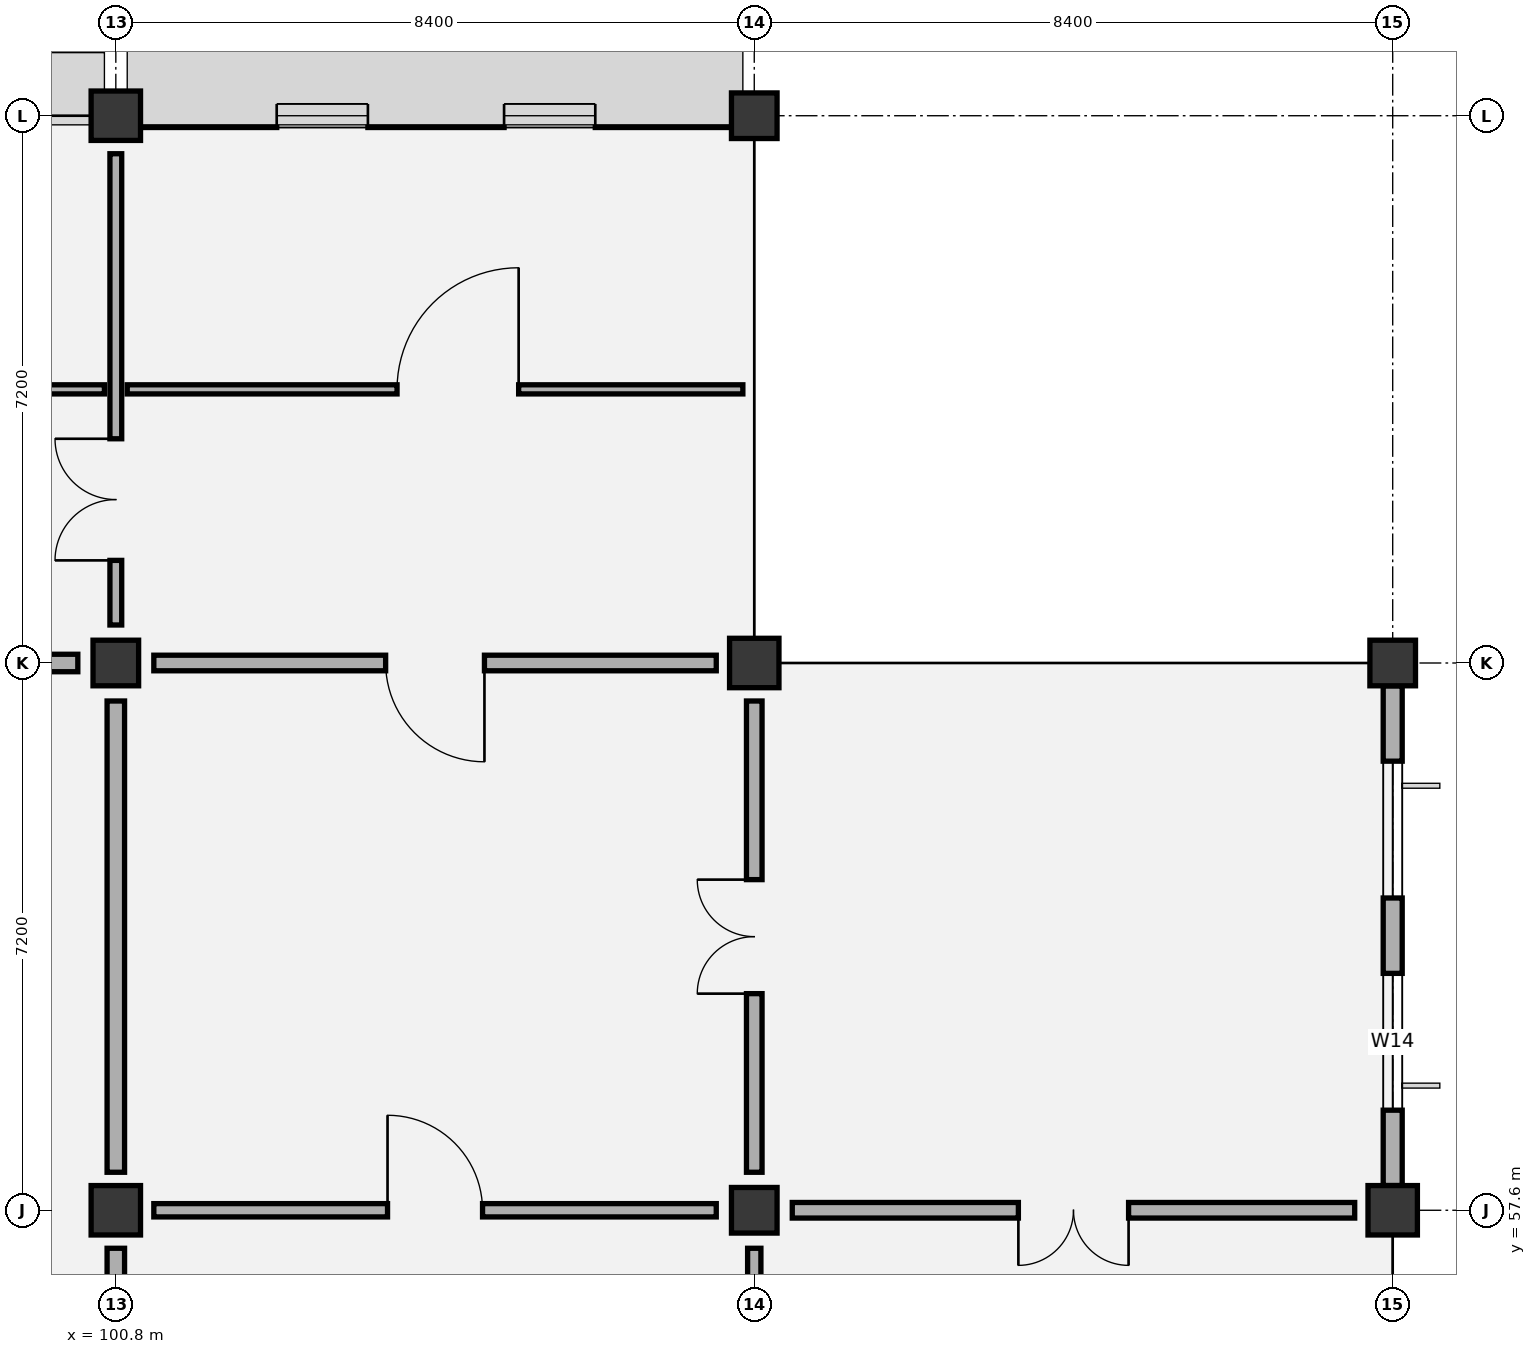
"""IFC4 building model, lengths in metres.
Left out: names, types, materials, properties, quantities, classifications, styles, units other than length and angle.
Written with IfcOpenShell. Run it as: python <this file> out.ifc"""

import sys

from ifc_helpers import new_model, si_unit, direction, frame, frame_2d, origin, origin_2d, place, context, subcontext, project, spatial, rectangle, extrude, element, fill, save


model = new_model("IFC4")
c1 = context("Model", 3, precision=1e-05, world=origin(), true_north=direction((0.0, 1.0)))
c2 = subcontext(c1, "Body", "Model", "MODEL_VIEW")
j1 = project(units=[si_unit("LENGTHUNIT", "METRE"), si_unit("PLANEANGLEUNIT", "RADIAN")], contexts=[c1])
p1 = place(None, origin())
s1 = spatial("IfcSite", under=j1, at=p1, CompositionType="ELEMENT")
p2 = place(p1, origin())
s2 = spatial("IfcBuilding", under=s1, at=p2, CompositionType="ELEMENT")
p3 = place(p2, frame((0.0, 0.0, 52.2)))
s3 = spatial("IfcBuildingStorey", under=s2, at=p3, CompositionType="ELEMENT", Elevation=52.2)
p4 = place(p3, frame((100.8, 57.6, 0.0), z_axis=(0.0, 0.0, 1.0), x_axis=(1.0, 0.0, 0.0)))
e1 = element("IfcColumn", 1, at=p4, inside=s3, PredefinedType="COLUMN", context=c2, shape_type="SweptSolid", body=[
    extrude(rectangle(XDim=0.65, YDim=0.65, at=origin_2d()), origin(), (0.0, 0.0, 1.0), 4.2),
])
p5 = place(p3, frame((100.8, 64.8, 0.0), z_axis=(0.0, 0.0, 1.0), x_axis=(1.0, 0.0, 0.0)))
e2 = element("IfcColumn", 2, at=p5, inside=s3, PredefinedType="COLUMN", context=c2, shape_type="SweptSolid", body=[
    extrude(rectangle(XDim=0.6, YDim=0.6, at=origin_2d()), origin(), (0.0, 0.0, 1.0), 4.2),
])
p6 = place(p3, frame((100.8, 72.0, 0.0), z_axis=(0.0, 0.0, 1.0), x_axis=(1.0, 0.0, 0.0)))
e3 = element("IfcColumn", 3, at=p6, inside=s3, PredefinedType="COLUMN", context=c2, shape_type="SweptSolid", body=[
    extrude(rectangle(XDim=0.65, YDim=0.65, at=origin_2d()), origin(), (0.0, 0.0, 1.0), 4.2),
])
p7 = place(p3, frame((109.2, 57.6, 0.0), z_axis=(0.0, 0.0, 1.0), x_axis=(1.0, 0.0, 0.0)))
e4 = element("IfcColumn", 4, at=p7, inside=s3, PredefinedType="COLUMN", context=c2, shape_type="SweptSolid", body=[
    extrude(rectangle(XDim=0.6, YDim=0.6, at=origin_2d()), origin(), (0.0, 0.0, 1.0), 4.2),
])
p8 = place(p3, frame((109.2, 64.8, 0.0), z_axis=(0.0, 0.0, 1.0), x_axis=(1.0, 0.0, 0.0)))
e5 = element("IfcColumn", 5, at=p8, inside=s3, PredefinedType="COLUMN", context=c2, shape_type="SweptSolid", body=[
    extrude(rectangle(XDim=0.65, YDim=0.65, at=origin_2d()), origin(), (0.0, 0.0, 1.0), 4.2),
])
p9 = place(p3, frame((109.2, 72.0, 0.0), z_axis=(0.0, 0.0, 1.0), x_axis=(1.0, 0.0, 0.0)))
e6 = element("IfcColumn", 6, at=p9, inside=s3, PredefinedType="COLUMN", context=c2, shape_type="SweptSolid", body=[
    extrude(rectangle(XDim=0.6, YDim=0.6, at=origin_2d()), origin(), (0.0, 0.0, 1.0), 4.2),
])
p10 = place(p3, frame((117.6, 57.6, 0.0), z_axis=(0.0, 0.0, 1.0), x_axis=(1.0, 0.0, 0.0)))
e7 = element("IfcColumn", 7, at=p10, inside=s3, PredefinedType="COLUMN", context=c2, shape_type="SweptSolid", body=[
    extrude(rectangle(XDim=0.65, YDim=0.65, at=origin_2d()), origin(), (0.0, 0.0, 1.0), 4.2),
])
p11 = place(p3, frame((117.6, 64.8, 0.0), z_axis=(0.0, 0.0, 1.0), x_axis=(1.0, 0.0, 0.0)))
e8 = element("IfcColumn", 8, at=p11, inside=s3, PredefinedType="COLUMN", context=c2, shape_type="SweptSolid", body=[
    extrude(rectangle(XDim=0.6, YDim=0.6, at=origin_2d()), origin(), (0.0, 0.0, 1.0), 4.2),
])
p12 = place(p3, frame((101.125, 72.0, 0.0), z_axis=(0.0, 0.0, 1.0), x_axis=(1.0, 0.0, 0.0)))
e9 = element("IfcWall", 9, at=p12, inside=s3, PredefinedType="SOLIDWALL", context=c2, shape_type="SweptSolid", body=[
    extrude(rectangle(XDim=7.775, YDim=0.31, at=frame_2d((3.887, 0.0))), origin(), (0.0, 0.0, 1.0), 3.365),
])
p13 = place(p12, frame((1.792, 0.0, 0.95)))
e10 = element("IfcOpeningElement", 10, at=p13, cuts=e9, PredefinedType="OPENING", context=c2, shape_type="SweptSolid", body=[
    extrude(rectangle(XDim=1.2, YDim=1.5, at=frame_2d((0.6, 0.75))), frame((0.0, 0.165, 0.0), z_axis=(0.0, -1.0, 0.0), x_axis=(1.0, 0.0, 0.0)), (0.0, 0.0, 1.0), 0.33),
])
p14 = place(p12, frame((4.783, 0.0, 0.95)))
e11 = element("IfcOpeningElement", 11, at=p14, cuts=e9, PredefinedType="OPENING", context=c2, shape_type="SweptSolid", body=[
    extrude(rectangle(XDim=1.2, YDim=1.5, at=frame_2d((0.6, 0.75))), frame((0.0, 0.165, 0.0), z_axis=(0.0, -1.0, 0.0), x_axis=(1.0, 0.0, 0.0)), (0.0, 0.0, 1.0), 0.33),
])
p15 = place(p3, frame((117.6, 57.925, 0.0), z_axis=(0.0, 0.0, 1.0), x_axis=(0.0, 1.0, 0.0)))
e12 = element("IfcWall", 12, at=p15, inside=s3, PredefinedType="SOLIDWALL", context=c2, shape_type="SweptSolid", body=[
    extrude(rectangle(XDim=6.575, YDim=0.25, at=frame_2d((3.288, 0.0))), origin(), (0.0, 0.0, 1.0), 3.365),
])
p16 = place(p15, frame((0.992, 0.0, 0.95)))
e13 = element("IfcOpeningElement", 13, at=p16, cuts=e12, PredefinedType="OPENING", context=c2, shape_type="SweptSolid", body=[
    extrude(rectangle(XDim=1.8, YDim=1.5, at=frame_2d((0.9, 0.75))), frame((0.0, 0.135, 0.0), z_axis=(0.0, -1.0, 0.0), x_axis=(1.0, 0.0, 0.0)), (0.0, 0.0, 1.0), 0.27),
])
p17 = place(p15, frame((3.783, 0.0, 0.95)))
e14 = element("IfcOpeningElement", 14, at=p17, cuts=e12, PredefinedType="OPENING", context=c2, shape_type="SweptSolid", body=[
    extrude(rectangle(XDim=1.8, YDim=1.5, at=frame_2d((0.9, 0.75))), frame((0.0, 0.135, 0.0), z_axis=(0.0, -1.0, 0.0), x_axis=(1.0, 0.0, 0.0)), (0.0, 0.0, 1.0), 0.27),
])
p18 = place(p3, frame((109.32, 72.0, 0.0), z_axis=(0.0, 0.0, 1.0), x_axis=(1.0, 0.0, 0.0)))
e15 = element("IfcWall", 15, at=p18, inside=s3, PredefinedType="PARAPET", context=c2, shape_type="SweptSolid", body=[
    extrude(rectangle(XDim=8.16, YDim=0.185, at=frame_2d((4.08, 0.0))), origin(), (0.0, 0.0, 1.0), 1.15),
])
p19 = place(p3, frame((117.6, 64.92, 0.0), z_axis=(0.0, 0.0, 1.0), x_axis=(0.0, 1.0, 0.0)))
e16 = element("IfcWall", 16, at=p19, inside=s3, PredefinedType="PARAPET", context=c2, shape_type="SweptSolid", body=[
    extrude(rectangle(XDim=6.96, YDim=0.185, at=frame_2d((3.48, 0.0))), origin(), (0.0, 0.0, 1.0), 1.15),
])
p20 = place(p3, frame((92.55, 68.4, 0.0), z_axis=(0.0, 0.0, 1.0), x_axis=(1.0, 0.0, 0.0)))
e17 = element("IfcWall", 17, at=p20, inside=s3, PredefinedType="PARTITIONING", context=c2, shape_type="SweptSolid", body=[
    extrude(rectangle(XDim=8.1, YDim=0.12, at=frame_2d((4.05, 0.0))), origin(), (0.0, 0.0, 1.0), 3.92),
])
p21 = place(p20, frame((3.55, 0.0, 0.0)))
e18 = element("IfcOpeningElement", 18, at=p21, cuts=e17, PredefinedType="OPENING", context=c2, shape_type="SweptSolid", body=[
    extrude(rectangle(XDim=1.6, YDim=2.2, at=frame_2d((0.8, 1.1))), frame((0.0, 0.07, 0.0), z_axis=(0.0, -1.0, 0.0), x_axis=(1.0, 0.0, 0.0)), (0.0, 0.0, 1.0), 0.14),
])
p22 = place(p3, frame((100.95, 68.4, 0.0), z_axis=(0.0, 0.0, 1.0), x_axis=(1.0, 0.0, 0.0)))
e19 = element("IfcWall", 19, at=p22, inside=s3, PredefinedType="PARTITIONING", context=c2, shape_type="SweptSolid", body=[
    extrude(rectangle(XDim=8.1, YDim=0.12, at=frame_2d((4.05, 0.0))), origin(), (0.0, 0.0, 1.0), 3.92),
])
p23 = place(p22, frame((3.55, 0.0, 0.0)))
e20 = element("IfcOpeningElement", 20, at=p23, cuts=e19, PredefinedType="OPENING", context=c2, shape_type="SweptSolid", body=[
    extrude(rectangle(XDim=1.6, YDim=2.2, at=frame_2d((0.8, 1.1))), frame((0.0, 0.07, 0.0), z_axis=(0.0, -1.0, 0.0), x_axis=(1.0, 0.0, 0.0)), (0.0, 0.0, 1.0), 0.14),
])
p24 = place(p3, frame((100.8, 50.9, 0.0), z_axis=(0.0, 0.0, 1.0), x_axis=(0.0, 1.0, 0.0)))
e21 = element("IfcWall", 21, at=p24, inside=s3, PredefinedType="PARTITIONING", context=c2, shape_type="SweptSolid", body=[
    extrude(rectangle(XDim=6.2, YDim=0.23, at=frame_2d((3.1, 0.0))), origin(), (0.0, 0.0, 1.0), 3.515),
])
p25 = place(p3, frame((100.8, 58.1, 0.0), z_axis=(0.0, 0.0, 1.0), x_axis=(0.0, 1.0, 0.0)))
e22 = element("IfcWall", 22, at=p25, inside=s3, PredefinedType="PARTITIONING", context=c2, shape_type="SweptSolid", body=[
    extrude(rectangle(XDim=6.2, YDim=0.23, at=frame_2d((3.1, 0.0))), origin(), (0.0, 0.0, 1.0), 3.415),
])
p26 = place(p3, frame((92.9, 64.8, 0.0), z_axis=(0.0, 0.0, 1.0), x_axis=(1.0, 0.0, 0.0)))
e23 = element("IfcWall", 23, at=p26, inside=s3, PredefinedType="PARTITIONING", context=c2, shape_type="SweptSolid", body=[
    extrude(rectangle(XDim=7.4, YDim=0.23, at=frame_2d((3.7, 0.0))), origin(), (0.0, 0.0, 1.0), 3.515),
])
p27 = place(p3, frame((100.8, 65.3, 0.0), z_axis=(0.0, 0.0, 1.0), x_axis=(0.0, 1.0, 0.0)))
e24 = element("IfcWall", 24, at=p27, inside=s3, PredefinedType="PARTITIONING", context=c2, shape_type="SweptSolid", body=[
    extrude(rectangle(XDim=6.2, YDim=0.155, at=frame_2d((3.1, 0.0))), origin(), (0.0, 0.0, 1.0), 3.625),
])
p28 = place(p27, frame((0.85, 0.0, 0.0)))
e25 = element("IfcOpeningElement", 25, at=p28, cuts=e24, PredefinedType="OPENING", context=c2, shape_type="SweptSolid", body=[
    extrude(rectangle(XDim=1.6, YDim=2.2, at=frame_2d((0.8, 1.1))), frame((0.0, 0.087, 0.0), z_axis=(0.0, -1.0, 0.0), x_axis=(1.0, 0.0, 0.0)), (0.0, 0.0, 1.0), 0.175),
])
p29 = place(p3, frame((109.2, 50.9, 0.0), z_axis=(0.0, 0.0, 1.0), x_axis=(0.0, 1.0, 0.0)))
e26 = element("IfcWall", 26, at=p29, inside=s3, PredefinedType="PARTITIONING", context=c2, shape_type="SweptSolid", body=[
    extrude(rectangle(XDim=6.2, YDim=0.175, at=frame_2d((3.1, 0.0))), origin(), (0.0, 0.0, 1.0), 3.415),
])
p30 = place(p3, frame((101.3, 57.6, 0.0), z_axis=(0.0, 0.0, 1.0), x_axis=(1.0, 0.0, 0.0)))
e27 = element("IfcWall", 27, at=p30, inside=s3, PredefinedType="PARTITIONING", context=c2, shape_type="SweptSolid", body=[
    extrude(rectangle(XDim=7.4, YDim=0.175, at=frame_2d((3.7, 0.0))), origin(), (0.0, 0.0, 1.0), 3.565),
])
p31 = place(p30, frame((3.075, 0.0, 0.0)))
e28 = element("IfcOpeningElement", 28, at=p31, cuts=e27, PredefinedType="OPENING", context=c2, shape_type="SweptSolid", body=[
    extrude(rectangle(XDim=1.25, YDim=2.1, at=frame_2d((0.625, 1.05))), frame((0.0, 0.097, 0.0), z_axis=(0.0, -1.0, 0.0), x_axis=(1.0, 0.0, 0.0)), (0.0, 0.0, 1.0), 0.195),
])
p32 = place(p3, frame((109.2, 58.1, 0.0), z_axis=(0.0, 0.0, 1.0), x_axis=(0.0, 1.0, 0.0)))
e29 = element("IfcWall", 29, at=p32, inside=s3, PredefinedType="PARTITIONING", context=c2, shape_type="SweptSolid", body=[
    extrude(rectangle(XDim=6.2, YDim=0.205, at=frame_2d((3.1, 0.0))), origin(), (0.0, 0.0, 1.0), 3.625),
])
p33 = place(p32, frame((2.35, 0.0, 0.0)))
e30 = element("IfcOpeningElement", 30, at=p33, cuts=e29, PredefinedType="OPENING", context=c2, shape_type="SweptSolid", body=[
    extrude(rectangle(XDim=1.5, YDim=2.2, at=frame_2d((0.75, 1.1))), frame((0.0, 0.113, 0.0), z_axis=(0.0, -1.0, 0.0), x_axis=(1.0, 0.0, 0.0)), (0.0, 0.0, 1.0), 0.225),
])
p34 = place(p3, frame((101.3, 64.8, 0.0), z_axis=(0.0, 0.0, 1.0), x_axis=(1.0, 0.0, 0.0)))
e31 = element("IfcWall", 31, at=p34, inside=s3, PredefinedType="PARTITIONING", context=c2, shape_type="SweptSolid", body=[
    extrude(rectangle(XDim=7.4, YDim=0.205, at=frame_2d((3.7, 0.0))), origin(), (0.0, 0.0, 1.0), 3.565),
])
p35 = place(p34, frame((3.05, 0.0, 0.0)))
e32 = element("IfcOpeningElement", 32, at=p35, cuts=e31, PredefinedType="OPENING", context=c2, shape_type="SweptSolid", body=[
    extrude(rectangle(XDim=1.3, YDim=2.15, at=frame_2d((0.65, 1.075))), frame((0.0, 0.113, 0.0), z_axis=(0.0, -1.0, 0.0), x_axis=(1.0, 0.0, 0.0)), (0.0, 0.0, 1.0), 0.225),
])
p36 = place(p3, frame((109.7, 57.6, 0.0), z_axis=(0.0, 0.0, 1.0), x_axis=(1.0, 0.0, 0.0)))
e33 = element("IfcWall", 33, at=p36, inside=s3, PredefinedType="PARTITIONING", context=c2, shape_type="SweptSolid", body=[
    extrude(rectangle(XDim=7.4, YDim=0.205, at=frame_2d((3.7, 0.0))), origin(), (0.0, 0.0, 1.0), 3.365),
])
p37 = place(p36, frame((2.975, 0.0, 0.0)))
e34 = element("IfcOpeningElement", 34, at=p37, cuts=e33, PredefinedType="OPENING", context=c2, shape_type="SweptSolid", body=[
    extrude(rectangle(XDim=1.45, YDim=2.2, at=frame_2d((0.725, 1.1))), frame((0.0, 0.113, 0.0), z_axis=(0.0, -1.0, 0.0), x_axis=(1.0, 0.0, 0.0)), (0.0, 0.0, 1.0), 0.225),
])
p38 = place(p13, origin())
e35 = element("IfcWindow", 35, at=p38, inside=s3, PartitioningType="SINGLE_PANEL", PredefinedType="WINDOW", context=c2, shape_type="SweptSolid", body=[
    extrude(rectangle(XDim=1.2, YDim=1.5, at=frame_2d((0.6, 0.75))), frame((0.0, 0.03, 0.0), z_axis=(0.0, -1.0, 0.0), x_axis=(1.0, 0.0, 0.0)), (0.0, 0.0, 1.0), 0.06),
])
fill(e10, e35)
p39 = place(p14, origin())
e36 = element("IfcWindow", 36, at=p39, inside=s3, PartitioningType="SINGLE_PANEL", PredefinedType="WINDOW", context=c2, shape_type="SweptSolid", body=[
    extrude(rectangle(XDim=1.2, YDim=1.5, at=frame_2d((0.6, 0.75))), frame((0.0, 0.03, 0.0), z_axis=(0.0, -1.0, 0.0), x_axis=(1.0, 0.0, 0.0)), (0.0, 0.0, 1.0), 0.06),
])
fill(e11, e36)
p40 = place(p16, origin())
e37 = element("IfcWindow", 37, at=p40, inside=s3, PartitioningType="SINGLE_PANEL", PredefinedType="WINDOW", context=c2, shape_type="SweptSolid", body=[
    extrude(rectangle(XDim=1.8, YDim=1.5, at=frame_2d((0.9, 0.75))), frame((0.0, 0.03, 0.0), z_axis=(0.0, -1.0, 0.0), x_axis=(1.0, 0.0, 0.0)), (0.0, 0.0, 1.0), 0.06),
])
fill(e13, e37)
p41 = place(p17, origin())
e38 = element("IfcWindow", 38, at=p41, inside=s3, PartitioningType="SINGLE_PANEL", PredefinedType="WINDOW", context=c2, shape_type="SweptSolid", body=[
    extrude(rectangle(XDim=1.8, YDim=1.5, at=frame_2d((0.9, 0.75))), frame((0.0, 0.03, 0.0), z_axis=(0.0, -1.0, 0.0), x_axis=(1.0, 0.0, 0.0)), (0.0, 0.0, 1.0), 0.06),
])
fill(e14, e38)
p42 = place(p23, origin())
e39 = element("IfcDoor", 39, at=p42, inside=s3, OperationType="SINGLE_SWING_RIGHT", PredefinedType="DOOR", context=c2, shape_type="SweptSolid", body=[
    extrude(rectangle(XDim=1.6, YDim=2.2, at=frame_2d((0.8, 1.1))), frame((0.0, 0.025, 0.0), z_axis=(0.0, -1.0, 0.0), x_axis=(1.0, 0.0, 0.0)), (0.0, 0.0, 1.0), 0.05),
])
fill(e20, e39)
p43 = place(p28, origin())
e40 = element("IfcDoor", 40, at=p43, inside=s3, OperationType="DOUBLE_DOOR_SINGLE_SWING", PredefinedType="DOOR", context=c2, shape_type="SweptSolid", body=[
    extrude(rectangle(XDim=1.6, YDim=2.2, at=frame_2d((0.8, 1.1))), frame((0.0, 0.025, 0.0), z_axis=(0.0, -1.0, 0.0), x_axis=(1.0, 0.0, 0.0)), (0.0, 0.0, 1.0), 0.05),
])
fill(e25, e40)
p44 = place(p31, origin())
e41 = element("IfcDoor", 41, at=p44, inside=s3, OperationType="SINGLE_SWING_LEFT", PredefinedType="DOOR", context=c2, shape_type="SweptSolid", body=[
    extrude(rectangle(XDim=1.25, YDim=2.1, at=frame_2d((0.625, 1.05))), frame((0.0, 0.025, 0.0), z_axis=(0.0, -1.0, 0.0), x_axis=(1.0, 0.0, 0.0)), (0.0, 0.0, 1.0), 0.05),
])
fill(e28, e41)
p45 = place(p33, origin())
e42 = element("IfcDoor", 42, at=p45, inside=s3, OperationType="DOUBLE_DOOR_SINGLE_SWING", PredefinedType="DOOR", context=c2, shape_type="SweptSolid", body=[
    extrude(rectangle(XDim=1.5, YDim=2.2, at=frame_2d((0.75, 1.1))), frame((0.0, 0.025, 0.0), z_axis=(0.0, -1.0, 0.0), x_axis=(1.0, 0.0, 0.0)), (0.0, 0.0, 1.0), 0.05),
])
fill(e30, e42)
p46 = place(p35, frame((1.3, 0.0, 0.0), z_axis=(0.0, 0.0, 1.0), x_axis=(-1.0, 0.0, 0.0)))
e43 = element("IfcDoor", 43, at=p46, inside=s3, OperationType="SINGLE_SWING_LEFT", PredefinedType="DOOR", context=c2, shape_type="SweptSolid", body=[
    extrude(rectangle(XDim=1.3, YDim=2.15, at=frame_2d((0.65, 1.075))), frame((0.0, 0.025, 0.0), z_axis=(0.0, -1.0, 0.0), x_axis=(1.0, 0.0, 0.0)), (0.0, 0.0, 1.0), 0.05),
])
fill(e32, e43)
p47 = place(p37, frame((1.45, 0.0, 0.0), z_axis=(0.0, 0.0, 1.0), x_axis=(-1.0, 0.0, 0.0)))
e44 = element("IfcDoor", 44, at=p47, inside=s3, OperationType="DOUBLE_DOOR_SINGLE_SWING", PredefinedType="DOOR", context=c2, shape_type="SweptSolid", body=[
    extrude(rectangle(XDim=1.45, YDim=2.2, at=frame_2d((0.725, 1.1))), frame((0.0, 0.025, 0.0), z_axis=(0.0, -1.0, 0.0), x_axis=(1.0, 0.0, 0.0)), (0.0, 0.0, 1.0), 0.05),
])
fill(e34, e44)
save(model, sys.argv[1])
